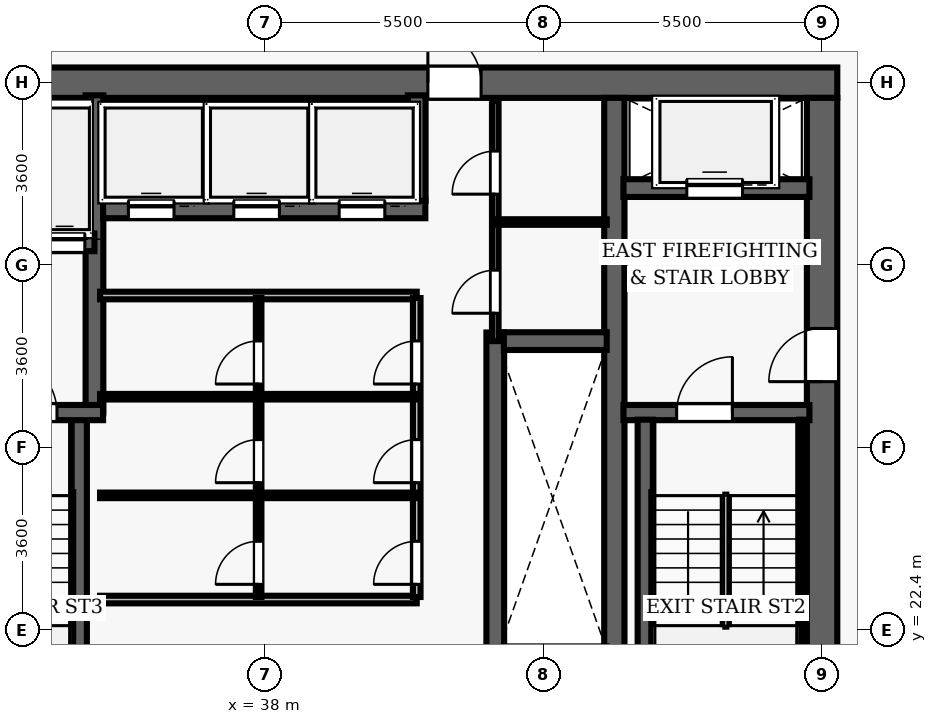
"""IFC4 building model, lengths in metres.
Left out: names, types, materials, properties, quantities, classifications, styles, units other than length and angle.
Written with IfcOpenShell. Run it as: python <this file> out.ifc"""

import sys

from ifc_helpers import new_model, si_unit, direction, frame, frame_2d, origin, place, context, subcontext, project, spatial, rectangle, extrude, element, fill, save


model = new_model("IFC4")
c1 = context("Model", 3, precision=1e-05, world=origin(), true_north=direction((0.0, 1.0)))
c2 = subcontext(c1, "Body", "Model", "MODEL_VIEW")
j1 = project(units=[si_unit("LENGTHUNIT", "METRE"), si_unit("PLANEANGLEUNIT", "RADIAN")], contexts=[c1])
p1 = place(None, origin())
s1 = spatial("IfcSite", under=j1, at=p1, CompositionType="ELEMENT")
p2 = place(p1, origin())
s2 = spatial("IfcBuilding", under=s1, at=p2, CompositionType="ELEMENT")
p3 = place(p2, frame((0.0, 0.0, 86.9)))
s3 = spatial("IfcBuildingStorey", under=s2, at=p3, CompositionType="ELEMENT", Elevation=86.9)
p4 = place(p3, frame((26.7, 33.2, 0.0), z_axis=(0.0, 0.0, 1.0), x_axis=(1.0, 0.0, 0.0)))
e1 = element("IfcWall", 1, at=p4, inside=s3, PredefinedType="SHEAR", context=c2, shape_type="SweptSolid", body=[
    extrude(rectangle(XDim=22.6, YDim=0.6, at=frame_2d((11.3, 0.0))), origin(), (0.0, 0.0, 1.0), 3.5),
])
p5 = place(p4, frame((4.62, 0.0, 0.0)))
e2 = element("IfcOpeningElement", 2, at=p5, cuts=e1, PredefinedType="OPENING", context=c2, shape_type="SweptSolid", body=[
    extrude(rectangle(XDim=1.05, YDim=2.15, at=frame_2d((0.525, 1.075))), frame((0.0, 0.31, 0.0), z_axis=(0.0, -1.0, 0.0), x_axis=(1.0, 0.0, 0.0)), (0.0, 0.0, 1.0), 0.62),
])
p6 = place(p4, frame((14.52, 0.0, 0.0)))
e3 = element("IfcOpeningElement", 3, at=p6, cuts=e1, PredefinedType="OPENING", context=c2, shape_type="SweptSolid", body=[
    extrude(rectangle(XDim=1.05, YDim=2.15, at=frame_2d((0.525, 1.075))), frame((0.0, 0.31, 0.0), z_axis=(0.0, -1.0, 0.0), x_axis=(1.0, 0.0, 0.0)), (0.0, 0.0, 1.0), 0.62),
])
p7 = place(p3, frame((49.0, 19.1, 0.0), z_axis=(0.0, 0.0, 1.0), x_axis=(0.0, 1.0, 0.0)))
e4 = element("IfcWall", 4, at=p7, inside=s3, PredefinedType="SHEAR", context=c2, shape_type="SweptSolid", body=[
    extrude(rectangle(XDim=13.8, YDim=0.6, at=frame_2d((6.9, 0.0))), origin(), (0.0, 0.0, 1.0), 3.5),
])
p8 = place(p7, frame((8.2, 0.0, 0.0)))
e5 = element("IfcOpeningElement", 5, at=p8, cuts=e4, PredefinedType="OPENING", context=c2, shape_type="SweptSolid", body=[
    extrude(rectangle(XDim=1.05, YDim=2.15, at=frame_2d((0.525, 1.075))), frame((0.0, 0.31, 0.0), z_axis=(0.0, -1.0, 0.0), x_axis=(1.0, 0.0, 0.0)), (0.0, 0.0, 1.0), 0.62),
])
p9 = place(p3, frame((44.9, 19.1, 0.0), z_axis=(0.0, 0.0, 1.0), x_axis=(0.0, 1.0, 0.0)))
e6 = element("IfcWall", 6, at=p9, inside=s3, PredefinedType="SHEAR", context=c2, shape_type="SweptSolid", body=[
    extrude(rectangle(XDim=13.8, YDim=0.4, at=frame_2d((6.9, 0.0))), origin(), (0.0, 0.0, 1.0), 3.5),
])
p10 = place(p3, frame((45.08, 26.69, 0.0), z_axis=(0.0, 0.0, 1.0), x_axis=(1.0, 0.0, 0.0)))
e7 = element("IfcWall", 7, at=p10, inside=s3, PredefinedType="SHEAR", context=c2, shape_type="SweptSolid", body=[
    extrude(rectangle(XDim=3.67, YDim=0.3, at=frame_2d((1.835, 0.0))), origin(), (0.0, 0.0, 1.0), 3.5),
])
p11 = place(p10, frame((1.05, 0.0, 0.0)))
e8 = element("IfcOpeningElement", 8, at=p11, cuts=e7, PredefinedType="OPENING", context=c2, shape_type="SweptSolid", body=[
    extrude(rectangle(XDim=1.1, YDim=2.15, at=frame_2d((0.55, 1.075))), frame((0.0, 0.16, 0.0), z_axis=(0.0, -1.0, 0.0), x_axis=(1.0, 0.0, 0.0)), (0.0, 0.0, 1.0), 0.32),
])
p12 = place(p3, frame((45.51, 19.05, 0.0), z_axis=(0.0, 0.0, 1.0), x_axis=(0.0, 1.0, 0.0)))
e9 = element("IfcWall", 9, at=p12, inside=s3, PredefinedType="SHEAR", context=c2, shape_type="SweptSolid", body=[
    extrude(rectangle(XDim=7.5, YDim=0.3, at=frame_2d((3.75, 0.0))), origin(), (0.0, 0.0, 1.0), 3.5),
])
p13 = place(p3, frame((48.605, 19.1, 0.0), z_axis=(0.0, 0.0, 1.0), x_axis=(0.0, 1.0, 0.0)))
e10 = element("IfcWall", 10, at=p13, inside=s3, PredefinedType="SHEAR", context=c2, shape_type="SweptSolid", body=[
    extrude(rectangle(XDim=7.45, YDim=0.12, at=frame_2d((3.725, 0.0))), origin(), (0.0, 0.0, 1.0), 3.5),
])
p14 = place(p3, frame((45.08, 31.12, 0.0), z_axis=(0.0, 0.0, 1.0), x_axis=(1.0, 0.0, 0.0)))
e11 = element("IfcWall", 11, at=p14, inside=s3, PredefinedType="SHEAR", context=c2, shape_type="SweptSolid", body=[
    extrude(rectangle(XDim=3.67, YDim=0.35, at=frame_2d((1.835, 0.0))), origin(), (0.0, 0.0, 1.0), 2.6),
])
p15 = place(p14, frame((1.25, 0.0, 0.0)))
e12 = element("IfcOpeningElement", 12, at=p15, cuts=e11, PredefinedType="OPENING", context=c2, shape_type="SweptSolid", body=[
    extrude(rectangle(XDim=1.1, YDim=2.15, at=frame_2d((0.55, 1.075))), frame((0.0, 0.185, 0.0), z_axis=(0.0, -1.0, 0.0), x_axis=(1.0, 0.0, 0.0)), (0.0, 0.0, 1.0), 0.37),
])
p16 = place(p3, frame((34.34, 19.05, 0.0), z_axis=(0.0, 0.0, 1.0), x_axis=(0.0, 1.0, 0.0)))
e13 = element("IfcWall", 13, at=p16, inside=s3, PredefinedType="SHEAR", context=c2, shape_type="SweptSolid", body=[
    extrude(rectangle(XDim=7.5, YDim=0.3, at=frame_2d((3.75, 0.0))), origin(), (0.0, 0.0, 1.0), 3.5),
])
p17 = place(p3, frame((34.64, 26.69, 0.0), z_axis=(0.0, 0.0, 1.0), x_axis=(0.0, 1.0, 0.0)))
e14 = element("IfcWall", 14, at=p17, inside=s3, PredefinedType="SHEAR", context=c2, shape_type="SweptSolid", body=[
    extrude(rectangle(XDim=6.26, YDim=0.35, at=frame_2d((3.13, 0.0))), origin(), (0.0, 0.0, 1.0), 3.5),
])
p18 = place(p3, frame((31.25, 26.69, 0.0), z_axis=(0.0, 0.0, 1.0), x_axis=(1.0, 0.0, 0.0)))
e15 = element("IfcWall", 15, at=p18, inside=s3, PredefinedType="SHEAR", context=c2, shape_type="SweptSolid", body=[
    extrude(rectangle(XDim=3.56, YDim=0.3, at=frame_2d((1.78, 0.0))), origin(), (0.0, 0.0, 1.0), 3.5),
])
p19 = place(p18, frame((1.55, 0.0, 0.0)))
e16 = element("IfcOpeningElement", 16, at=p19, cuts=e15, PredefinedType="OPENING", context=c2, shape_type="SweptSolid", body=[
    extrude(rectangle(XDim=1.1, YDim=2.15, at=frame_2d((0.55, 1.075))), frame((0.0, 0.16, 0.0), z_axis=(0.0, -1.0, 0.0), x_axis=(1.0, 0.0, 0.0)), (0.0, 0.0, 1.0), 0.32),
])
p20 = place(p3, frame((32.23, 30.05, 0.0), z_axis=(0.0, 0.0, 1.0), x_axis=(1.0, 0.0, 0.0)))
e17 = element("IfcWall", 17, at=p20, inside=s3, PredefinedType="SHEAR", context=c2, shape_type="SweptSolid", body=[
    extrude(rectangle(XDim=2.41, YDim=0.35, at=frame_2d((1.205, 0.0))), origin(), (0.0, 0.0, 1.0), 2.6),
])
p21 = place(p20, frame((0.42, 0.0, 0.0)))
e18 = element("IfcOpeningElement", 18, at=p21, cuts=e17, PredefinedType="OPENING", context=c2, shape_type="SweptSolid", body=[
    extrude(rectangle(XDim=0.8, YDim=2.15, at=frame_2d((0.4, 1.075))), frame((0.0, 0.185, 0.0), z_axis=(0.0, -1.0, 0.0), x_axis=(1.0, 0.0, 0.0)), (0.0, 0.0, 1.0), 0.37),
])
p22 = place(p20, frame((1.42, 0.0, 0.0)))
e19 = element("IfcOpeningElement", 19, at=p22, cuts=e17, PredefinedType="OPENING", context=c2, shape_type="SweptSolid", body=[
    extrude(rectangle(XDim=0.8, YDim=2.15, at=frame_2d((0.4, 1.075))), frame((0.0, 0.185, 0.0), z_axis=(0.0, -1.0, 0.0), x_axis=(1.0, 0.0, 0.0)), (0.0, 0.0, 1.0), 0.37),
])
p23 = place(p3, frame((42.55, 21.73, 0.0), z_axis=(0.0, 0.0, 1.0), x_axis=(0.0, 1.0, 0.0)))
e20 = element("IfcWall", 20, at=p23, inside=s3, PredefinedType="SHEAR", context=c2, shape_type="SweptSolid", body=[
    extrude(rectangle(XDim=6.54, YDim=0.35, at=frame_2d((3.27, 0.0))), origin(), (0.0, 0.0, 1.0), 2.6),
])
p24 = place(p3, frame((42.72, 28.1, 0.0), z_axis=(0.0, 0.0, 1.0), x_axis=(1.0, 0.0, 0.0)))
e21 = element("IfcWall", 21, at=p24, inside=s3, PredefinedType="SHEAR", context=c2, shape_type="SweptSolid", body=[
    extrude(rectangle(XDim=2.03, YDim=0.35, at=frame_2d((1.015, 0.0))), origin(), (0.0, 0.0, 1.0), 2.6),
])
p25 = place(p3, frame((34.81, 30.7, 0.0), z_axis=(0.0, 0.0, 1.0), x_axis=(1.0, 0.0, 0.0)))
e22 = element("IfcWall", 22, at=p25, inside=s3, PredefinedType="SHEAR", context=c2, shape_type="SweptSolid", body=[
    extrude(rectangle(XDim=6.36, YDim=0.35, at=frame_2d((3.18, 0.0))), origin(), (0.0, 0.0, 1.0), 2.6),
])
p26 = place(p25, frame((0.5, 0.0, 0.0)))
e23 = element("IfcOpeningElement", 23, at=p26, cuts=e22, PredefinedType="OPENING", context=c2, shape_type="SweptSolid", body=[
    extrude(rectangle(XDim=0.9, YDim=2.15, at=frame_2d((0.45, 1.075))), frame((0.0, 0.185, 0.0), z_axis=(0.0, -1.0, 0.0), x_axis=(1.0, 0.0, 0.0)), (0.0, 0.0, 1.0), 0.37),
])
p27 = place(p25, frame((2.58, 0.0, 0.0)))
e24 = element("IfcOpeningElement", 24, at=p27, cuts=e22, PredefinedType="OPENING", context=c2, shape_type="SweptSolid", body=[
    extrude(rectangle(XDim=0.9, YDim=2.15, at=frame_2d((0.45, 1.075))), frame((0.0, 0.185, 0.0), z_axis=(0.0, -1.0, 0.0), x_axis=(1.0, 0.0, 0.0)), (0.0, 0.0, 1.0), 0.37),
])
p28 = place(p25, frame((4.66, 0.0, 0.0)))
e25 = element("IfcOpeningElement", 25, at=p28, cuts=e22, PredefinedType="OPENING", context=c2, shape_type="SweptSolid", body=[
    extrude(rectangle(XDim=0.9, YDim=2.15, at=frame_2d((0.45, 1.075))), frame((0.0, 0.185, 0.0), z_axis=(0.0, -1.0, 0.0), x_axis=(1.0, 0.0, 0.0)), (0.0, 0.0, 1.0), 0.37),
])
p29 = place(p3, frame((41.0, 30.87, 0.0), z_axis=(0.0, 0.0, 1.0), x_axis=(0.0, 1.0, 0.0)))
e26 = element("IfcWall", 26, at=p29, inside=s3, PredefinedType="SHEAR", context=c2, shape_type="SweptSolid", body=[
    extrude(rectangle(XDim=2.08, YDim=0.35, at=frame_2d((1.04, 0.0))), origin(), (0.0, 0.0, 1.0), 2.6),
])
for number, where, z_axis, x_axis in (
    (27, (34.75, 29.0, 0.0), (0.0, 0.0, 1.0), (1.0, 0.0, 0.0)),
    (28, (34.75, 23.0, 0.0), (0.0, 0.0, 1.0), (1.0, 0.0, 0.0)),
):
    element("IfcWall", number, at=place(p3, frame(where, z_axis=z_axis, x_axis=x_axis)), inside=s3, PredefinedType="PARTITIONING", context=c2, shape_type="SweptSolid", body=[
        extrude(rectangle(XDim=6.25, YDim=0.15, at=frame_2d((3.125, 0.0))), origin(), (0.0, 0.0, 1.0), 2.6),
    ])
p30 = place(p3, frame((41.0, 23.05, 0.0), z_axis=(0.0, 0.0, 1.0), x_axis=(0.0, 1.0, 0.0)))
e29 = element("IfcWall", 29, at=p30, inside=s3, PredefinedType="PARTITIONING", context=c2, shape_type="SweptSolid", body=[
    extrude(rectangle(XDim=5.9, YDim=0.15, at=frame_2d((2.95, 0.0))), origin(), (0.0, 0.0, 1.0), 2.6),
])
p31 = place(p30, frame((0.25, 0.0, 0.0)))
e30 = element("IfcOpeningElement", 30, at=p31, cuts=e29, PredefinedType="OPENING", context=c2, shape_type="SweptSolid", body=[
    extrude(rectangle(XDim=0.85, YDim=2.1, at=frame_2d((0.425, 1.05))), frame((0.0, 0.085, 0.0), z_axis=(0.0, -1.0, 0.0), x_axis=(1.0, 0.0, 0.0)), (0.0, 0.0, 1.0), 0.17),
])
p32 = place(p30, frame((2.256, 0.0, 0.0)))
e31 = element("IfcOpeningElement", 31, at=p32, cuts=e29, PredefinedType="OPENING", context=c2, shape_type="SweptSolid", body=[
    extrude(rectangle(XDim=0.85, YDim=2.1, at=frame_2d((0.425, 1.05))), frame((0.0, 0.085, 0.0), z_axis=(0.0, -1.0, 0.0), x_axis=(1.0, 0.0, 0.0)), (0.0, 0.0, 1.0), 0.17),
])
p33 = place(p30, frame((4.203, 0.0, 0.0)))
e32 = element("IfcOpeningElement", 32, at=p33, cuts=e29, PredefinedType="OPENING", context=c2, shape_type="SweptSolid", body=[
    extrude(rectangle(XDim=0.85, YDim=2.1, at=frame_2d((0.425, 1.05))), frame((0.0, 0.085, 0.0), z_axis=(0.0, -1.0, 0.0), x_axis=(1.0, 0.0, 0.0)), (0.0, 0.0, 1.0), 0.17),
])
p34 = place(p3, frame((37.88, 23.05, 0.0), z_axis=(0.0, 0.0, 1.0), x_axis=(0.0, 1.0, 0.0)))
e33 = element("IfcWall", 33, at=p34, inside=s3, PredefinedType="PARTITIONING", context=c2, shape_type="SweptSolid", body=[
    extrude(rectangle(XDim=5.9, YDim=0.11, at=frame_2d((2.95, 0.0))), origin(), (0.0, 0.0, 1.0), 2.6),
])
p35 = place(p34, frame((0.25, 0.0, 0.0)))
e34 = element("IfcOpeningElement", 34, at=p35, cuts=e33, PredefinedType="OPENING", context=c2, shape_type="SweptSolid", body=[
    extrude(rectangle(XDim=0.85, YDim=2.1, at=frame_2d((0.425, 1.05))), frame((0.0, 0.065, 0.0), z_axis=(0.0, -1.0, 0.0), x_axis=(1.0, 0.0, 0.0)), (0.0, 0.0, 1.0), 0.13),
])
p36 = place(p34, frame((2.256, 0.0, 0.0)))
e35 = element("IfcOpeningElement", 35, at=p36, cuts=e33, PredefinedType="OPENING", context=c2, shape_type="SweptSolid", body=[
    extrude(rectangle(XDim=0.85, YDim=2.1, at=frame_2d((0.425, 1.05))), frame((0.0, 0.065, 0.0), z_axis=(0.0, -1.0, 0.0), x_axis=(1.0, 0.0, 0.0)), (0.0, 0.0, 1.0), 0.13),
])
p37 = place(p34, frame((4.203, 0.0, 0.0)))
e36 = element("IfcOpeningElement", 36, at=p37, cuts=e33, PredefinedType="OPENING", context=c2, shape_type="SweptSolid", body=[
    extrude(rectangle(XDim=0.85, YDim=2.1, at=frame_2d((0.425, 1.05))), frame((0.0, 0.065, 0.0), z_axis=(0.0, -1.0, 0.0), x_axis=(1.0, 0.0, 0.0)), (0.0, 0.0, 1.0), 0.13),
])
for number, where, z_axis, x_axis in (
    (37, (34.75, 25.056, 0.0), (0.0, 0.0, 1.0), (1.0, 0.0, 0.0)),
    (38, (34.75, 27.003, 0.0), (0.0, 0.0, 1.0), (1.0, 0.0, 0.0)),
):
    element("IfcWall", number, at=place(p3, frame(where, z_axis=z_axis, x_axis=x_axis)), inside=s3, PredefinedType="PARTITIONING", context=c2, shape_type="SweptSolid", body=[
        extrude(rectangle(XDim=6.25, YDim=0.11, at=frame_2d((3.125, 0.0))), origin(), (0.0, 0.0, 1.0), 2.6),
    ])
p38 = place(p3, frame((42.55, 28.1, 0.0), z_axis=(0.0, 0.0, 1.0), x_axis=(0.0, 1.0, 0.0)))
e39 = element("IfcWall", 39, at=p38, inside=s3, PredefinedType="PARTITIONING", context=c2, shape_type="SweptSolid", body=[
    extrude(rectangle(XDim=4.75, YDim=0.13, at=frame_2d((2.375, 0.0))), origin(), (0.0, 0.0, 1.0), 2.6),
])
p39 = place(p38, frame((0.55, 0.0, 0.0)))
e40 = element("IfcOpeningElement", 40, at=p39, cuts=e39, PredefinedType="OPENING", context=c2, shape_type="SweptSolid", body=[
    extrude(rectangle(XDim=0.85, YDim=2.1, at=frame_2d((0.425, 1.05))), frame((0.0, 0.075, 0.0), z_axis=(0.0, -1.0, 0.0), x_axis=(1.0, 0.0, 0.0)), (0.0, 0.0, 1.0), 0.15),
])
p40 = place(p38, frame((2.9, 0.0, 0.0)))
e41 = element("IfcOpeningElement", 41, at=p40, cuts=e39, PredefinedType="OPENING", context=c2, shape_type="SweptSolid", body=[
    extrude(rectangle(XDim=0.85, YDim=2.1, at=frame_2d((0.425, 1.05))), frame((0.0, 0.075, 0.0), z_axis=(0.0, -1.0, 0.0), x_axis=(1.0, 0.0, 0.0)), (0.0, 0.0, 1.0), 0.15),
])
p41 = place(p3, frame((42.55, 30.45, 0.0), z_axis=(0.0, 0.0, 1.0), x_axis=(1.0, 0.0, 0.0)))
e42 = element("IfcWall", 42, at=p41, inside=s3, PredefinedType="PARTITIONING", context=c2, shape_type="SweptSolid", body=[
    extrude(rectangle(XDim=2.2, YDim=0.11, at=frame_2d((1.1, 0.0))), origin(), (0.0, 0.0, 1.0), 2.6),
])
p42 = place(p11, origin())
e43 = element("IfcDoor", 43, at=p42, inside=s3, OperationType="SINGLE_SWING_RIGHT", PredefinedType="DOOR", context=c2, shape_type="SweptSolid", body=[
    extrude(rectangle(XDim=1.1, YDim=2.15, at=frame_2d((0.55, 1.075))), frame((0.0, 0.025, 0.0), z_axis=(0.0, -1.0, 0.0), x_axis=(1.0, 0.0, 0.0)), (0.0, 0.0, 1.0), 0.05),
])
fill(e8, e43)
p43 = place(p8, origin())
e44 = element("IfcDoor", 44, at=p43, inside=s3, OperationType="SINGLE_SWING_LEFT", PredefinedType="DOOR", context=c2, shape_type="SweptSolid", body=[
    extrude(rectangle(XDim=1.05, YDim=2.15, at=frame_2d((0.525, 1.075))), frame((0.0, 0.025, 0.0), z_axis=(0.0, -1.0, 0.0), x_axis=(1.0, 0.0, 0.0)), (0.0, 0.0, 1.0), 0.05),
])
fill(e5, e44)
p44 = place(p19, origin())
e45 = element("IfcDoor", 45, at=p44, inside=s3, OperationType="SINGLE_SWING_LEFT", PredefinedType="DOOR", context=c2, shape_type="SweptSolid", body=[
    extrude(rectangle(XDim=1.1, YDim=2.15, at=frame_2d((0.55, 1.075))), frame((0.0, 0.025, 0.0), z_axis=(0.0, -1.0, 0.0), x_axis=(1.0, 0.0, 0.0)), (0.0, 0.0, 1.0), 0.05),
])
fill(e16, e45)
p45 = place(p6, origin())
e46 = element("IfcDoor", 46, at=p45, inside=s3, OperationType="SINGLE_SWING_LEFT", PredefinedType="DOOR", context=c2, shape_type="SweptSolid", body=[
    extrude(rectangle(XDim=1.05, YDim=2.15, at=frame_2d((0.525, 1.075))), frame((0.0, 0.025, 0.0), z_axis=(0.0, -1.0, 0.0), x_axis=(1.0, 0.0, 0.0)), (0.0, 0.0, 1.0), 0.05),
])
fill(e3, e46)
p46 = place(p31, origin())
e47 = element("IfcDoor", 47, at=p46, inside=s3, OperationType="SINGLE_SWING_LEFT", PredefinedType="DOOR", context=c2, shape_type="SweptSolid", body=[
    extrude(rectangle(XDim=0.85, YDim=2.1, at=frame_2d((0.425, 1.05))), frame((0.0, 0.025, 0.0), z_axis=(0.0, -1.0, 0.0), x_axis=(1.0, 0.0, 0.0)), (0.0, 0.0, 1.0), 0.05),
])
fill(e30, e47)
p47 = place(p35, origin())
e48 = element("IfcDoor", 48, at=p47, inside=s3, OperationType="SINGLE_SWING_LEFT", PredefinedType="DOOR", context=c2, shape_type="SweptSolid", body=[
    extrude(rectangle(XDim=0.85, YDim=2.1, at=frame_2d((0.425, 1.05))), frame((0.0, 0.025, 0.0), z_axis=(0.0, -1.0, 0.0), x_axis=(1.0, 0.0, 0.0)), (0.0, 0.0, 1.0), 0.05),
])
fill(e34, e48)
p48 = place(p32, origin())
e49 = element("IfcDoor", 49, at=p48, inside=s3, OperationType="SINGLE_SWING_LEFT", PredefinedType="DOOR", context=c2, shape_type="SweptSolid", body=[
    extrude(rectangle(XDim=0.85, YDim=2.1, at=frame_2d((0.425, 1.05))), frame((0.0, 0.025, 0.0), z_axis=(0.0, -1.0, 0.0), x_axis=(1.0, 0.0, 0.0)), (0.0, 0.0, 1.0), 0.05),
])
fill(e31, e49)
p49 = place(p36, origin())
e50 = element("IfcDoor", 50, at=p49, inside=s3, OperationType="SINGLE_SWING_LEFT", PredefinedType="DOOR", context=c2, shape_type="SweptSolid", body=[
    extrude(rectangle(XDim=0.85, YDim=2.1, at=frame_2d((0.425, 1.05))), frame((0.0, 0.025, 0.0), z_axis=(0.0, -1.0, 0.0), x_axis=(1.0, 0.0, 0.0)), (0.0, 0.0, 1.0), 0.05),
])
fill(e35, e50)
p50 = place(p33, origin())
e51 = element("IfcDoor", 51, at=p50, inside=s3, OperationType="SINGLE_SWING_LEFT", PredefinedType="DOOR", context=c2, shape_type="SweptSolid", body=[
    extrude(rectangle(XDim=0.85, YDim=2.1, at=frame_2d((0.425, 1.05))), frame((0.0, 0.025, 0.0), z_axis=(0.0, -1.0, 0.0), x_axis=(1.0, 0.0, 0.0)), (0.0, 0.0, 1.0), 0.05),
])
fill(e32, e51)
p51 = place(p37, origin())
e52 = element("IfcDoor", 52, at=p51, inside=s3, OperationType="SINGLE_SWING_LEFT", PredefinedType="DOOR", context=c2, shape_type="SweptSolid", body=[
    extrude(rectangle(XDim=0.85, YDim=2.1, at=frame_2d((0.425, 1.05))), frame((0.0, 0.025, 0.0), z_axis=(0.0, -1.0, 0.0), x_axis=(1.0, 0.0, 0.0)), (0.0, 0.0, 1.0), 0.05),
])
fill(e36, e52)
p52 = place(p39, origin())
e53 = element("IfcDoor", 53, at=p52, inside=s3, OperationType="SINGLE_SWING_LEFT", PredefinedType="DOOR", context=c2, shape_type="SweptSolid", body=[
    extrude(rectangle(XDim=0.85, YDim=2.1, at=frame_2d((0.425, 1.05))), frame((0.0, 0.025, 0.0), z_axis=(0.0, -1.0, 0.0), x_axis=(1.0, 0.0, 0.0)), (0.0, 0.0, 1.0), 0.05),
])
fill(e40, e53)
p53 = place(p40, origin())
e54 = element("IfcDoor", 54, at=p53, inside=s3, OperationType="SINGLE_SWING_LEFT", PredefinedType="DOOR", context=c2, shape_type="SweptSolid", body=[
    extrude(rectangle(XDim=0.85, YDim=2.1, at=frame_2d((0.425, 1.05))), frame((0.0, 0.025, 0.0), z_axis=(0.0, -1.0, 0.0), x_axis=(1.0, 0.0, 0.0)), (0.0, 0.0, 1.0), 0.05),
])
fill(e41, e54)
p54 = place(p26, origin())
e55 = element("IfcDoor", 55, at=p54, inside=s3, OperationType="SLIDING_TO_LEFT", PredefinedType="DOOR", context=c2, shape_type="SweptSolid", body=[
    extrude(rectangle(XDim=0.9, YDim=2.15, at=frame_2d((0.45, 1.075))), frame((0.0, 0.025, 0.0), z_axis=(0.0, -1.0, 0.0), x_axis=(1.0, 0.0, 0.0)), (0.0, 0.0, 1.0), 0.05),
])
fill(e23, e55)
p55 = place(p27, origin())
e56 = element("IfcDoor", 56, at=p55, inside=s3, OperationType="SLIDING_TO_LEFT", PredefinedType="DOOR", context=c2, shape_type="SweptSolid", body=[
    extrude(rectangle(XDim=0.9, YDim=2.15, at=frame_2d((0.45, 1.075))), frame((0.0, 0.025, 0.0), z_axis=(0.0, -1.0, 0.0), x_axis=(1.0, 0.0, 0.0)), (0.0, 0.0, 1.0), 0.05),
])
fill(e24, e56)
p56 = place(p28, origin())
e57 = element("IfcDoor", 57, at=p56, inside=s3, OperationType="SLIDING_TO_LEFT", PredefinedType="DOOR", context=c2, shape_type="SweptSolid", body=[
    extrude(rectangle(XDim=0.9, YDim=2.15, at=frame_2d((0.45, 1.075))), frame((0.0, 0.025, 0.0), z_axis=(0.0, -1.0, 0.0), x_axis=(1.0, 0.0, 0.0)), (0.0, 0.0, 1.0), 0.05),
])
fill(e25, e57)
p57 = place(p15, origin())
e58 = element("IfcDoor", 58, at=p57, inside=s3, OperationType="SLIDING_TO_LEFT", PredefinedType="DOOR", context=c2, shape_type="SweptSolid", body=[
    extrude(rectangle(XDim=1.1, YDim=2.15, at=frame_2d((0.55, 1.075))), frame((0.0, 0.025, 0.0), z_axis=(0.0, -1.0, 0.0), x_axis=(1.0, 0.0, 0.0)), (0.0, 0.0, 1.0), 0.05),
])
fill(e12, e58)
p58 = place(p22, origin())
e59 = element("IfcDoor", 59, at=p58, inside=s3, OperationType="SLIDING_TO_LEFT", PredefinedType="DOOR", context=c2, shape_type="SweptSolid", body=[
    extrude(rectangle(XDim=0.8, YDim=2.15, at=frame_2d((0.4, 1.075))), frame((0.0, 0.025, 0.0), z_axis=(0.0, -1.0, 0.0), x_axis=(1.0, 0.0, 0.0)), (0.0, 0.0, 1.0), 0.05),
])
fill(e19, e59)
save(model, sys.argv[1])
